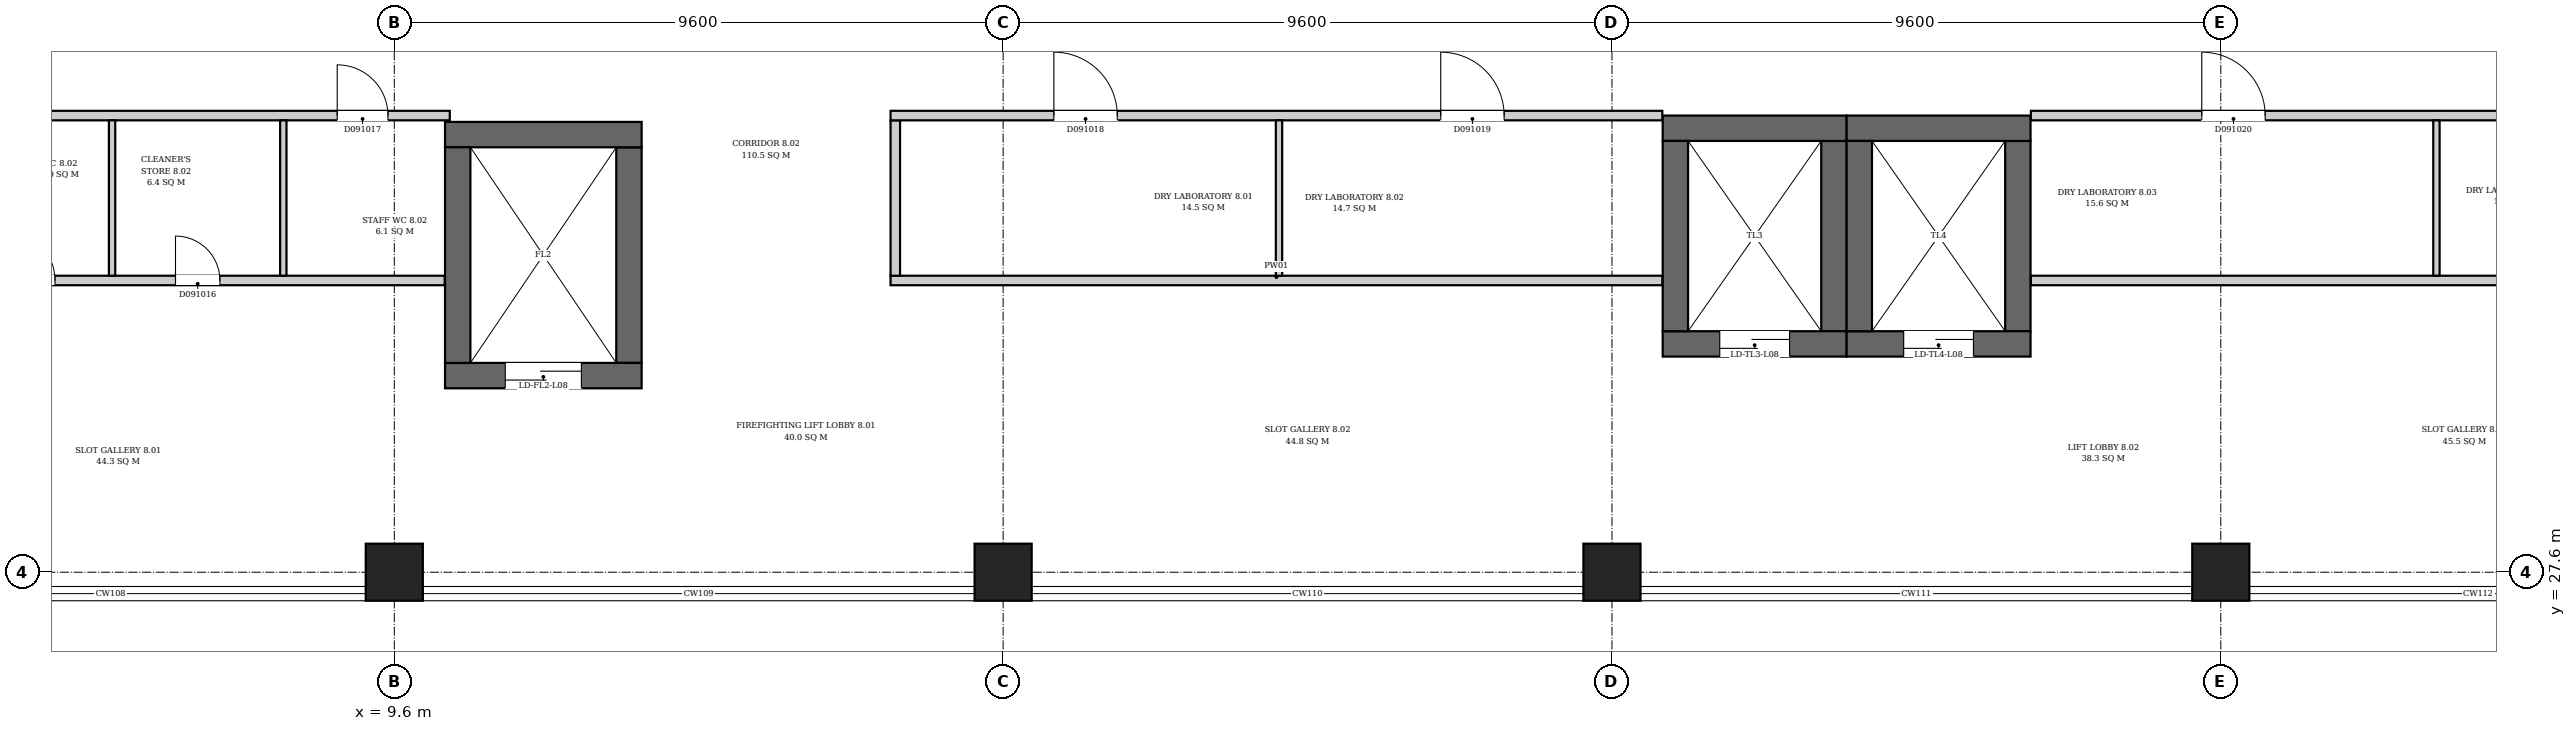
"""IFC4 building model, lengths in metres.
Left out: names, types, materials, properties, quantities, classifications, styles, units other than length and angle.
Written with IfcOpenShell. Run it as: python <this file> out.ifc"""

import sys

from ifc_helpers import new_model, si_unit, direction, frame, frame_2d, origin, origin_2d, place, context, subcontext, project, spatial, rectangle, extrude, element, fill, save


model = new_model("IFC4")
c1 = context("Model", 3, precision=1e-05, world=origin(), true_north=direction((0.0, 1.0)))
c2 = subcontext(c1, "Body", "Model", "MODEL_VIEW")
j1 = project(units=[si_unit("LENGTHUNIT", "METRE"), si_unit("PLANEANGLEUNIT", "RADIAN")], contexts=[c1])
p1 = place(None, origin())
s1 = spatial("IfcSite", under=j1, at=p1, CompositionType="ELEMENT")
p2 = place(p1, origin())
s2 = spatial("IfcBuilding", under=s1, at=p2, CompositionType="ELEMENT")
p3 = place(p2, frame((0.0, 0.0, 44.5)))
s3 = spatial("IfcBuildingStorey", under=s2, at=p3, CompositionType="ELEMENT", Elevation=44.5)
p4 = place(p3, frame((10.4, 30.7, 0.0), z_axis=(0.0, 0.0, 1.0), x_axis=(1.0, 0.0, 0.0)))
e1 = element("IfcWall", 1, at=p4, inside=s3, PredefinedType="SHEAR", context=c2, shape_type="SweptSolid", body=[
    extrude(rectangle(XDim=3.1, YDim=0.4, at=frame_2d((1.55, 0.0))), origin(), (0.0, 0.0, 1.0), 4.2),
])
p5 = place(p4, frame((0.95, 0.0, 0.0)))
e2 = element("IfcOpeningElement", 2, at=p5, cuts=e1, PredefinedType="OPENING", context=c2, shape_type="SweptSolid", body=[
    extrude(rectangle(XDim=1.2, YDim=2.1, at=frame_2d((0.6, 1.05))), frame((0.0, 0.21, 0.0), z_axis=(0.0, -1.0, 0.0), x_axis=(1.0, 0.0, 0.0)), (0.0, 0.0, 1.0), 0.42),
])
p6 = place(p3, frame((10.4, 34.5, 0.0), z_axis=(0.0, 0.0, 1.0), x_axis=(1.0, 0.0, 0.0)))
e3 = element("IfcWall", 3, at=p6, inside=s3, PredefinedType="SHEAR", context=c2, shape_type="SweptSolid", body=[
    extrude(rectangle(XDim=3.1, YDim=0.4, at=frame_2d((1.55, 0.0))), origin(), (0.0, 0.0, 1.0), 4.2),
])
for number, where, z_axis, x_axis in (
    (4, (10.6, 30.9, 0.0), (0.0, 0.0, 1.0), (0.0, 1.0, 0.0)),
    (5, (13.3, 30.9, 0.0), (0.0, 0.0, 1.0), (0.0, 1.0, 0.0)),
):
    element("IfcWall", number, at=place(p3, frame(where, z_axis=z_axis, x_axis=x_axis)), inside=s3, PredefinedType="SHEAR", context=c2, shape_type="SweptSolid", body=[
        extrude(rectangle(XDim=3.4, YDim=0.4, at=frame_2d((1.7, 0.0))), origin(), (0.0, 0.0, 1.0), 4.2),
    ])
p7 = place(p3, frame((29.6, 31.2, 0.0), z_axis=(0.0, 0.0, 1.0), x_axis=(1.0, 0.0, 0.0)))
e6 = element("IfcWall", 6, at=p7, inside=s3, PredefinedType="SHEAR", context=c2, shape_type="SweptSolid", body=[
    extrude(rectangle(XDim=2.9, YDim=0.4, at=frame_2d((1.45, 0.0))), origin(), (0.0, 0.0, 1.0), 4.2),
])
p8 = place(p7, frame((0.9, 0.0, 0.0)))
e7 = element("IfcOpeningElement", 7, at=p8, cuts=e6, PredefinedType="OPENING", context=c2, shape_type="SweptSolid", body=[
    extrude(rectangle(XDim=1.1, YDim=2.1, at=frame_2d((0.55, 1.05))), frame((0.0, 0.21, 0.0), z_axis=(0.0, -1.0, 0.0), x_axis=(1.0, 0.0, 0.0)), (0.0, 0.0, 1.0), 0.42),
])
p9 = place(p3, frame((29.6, 34.6, 0.0), z_axis=(0.0, 0.0, 1.0), x_axis=(1.0, 0.0, 0.0)))
e8 = element("IfcWall", 8, at=p9, inside=s3, PredefinedType="SHEAR", context=c2, shape_type="SweptSolid", body=[
    extrude(rectangle(XDim=2.9, YDim=0.4, at=frame_2d((1.45, 0.0))), origin(), (0.0, 0.0, 1.0), 4.2),
])
for number, where, z_axis, x_axis in (
    (9, (29.8, 31.4, 0.0), (0.0, 0.0, 1.0), (0.0, 1.0, 0.0)),
    (10, (32.3, 31.4, 0.0), (0.0, 0.0, 1.0), (0.0, 1.0, 0.0)),
):
    element("IfcWall", number, at=place(p3, frame(where, z_axis=z_axis, x_axis=x_axis)), inside=s3, PredefinedType="SHEAR", context=c2, shape_type="SweptSolid", body=[
        extrude(rectangle(XDim=3.0, YDim=0.4, at=frame_2d((1.5, 0.0))), origin(), (0.0, 0.0, 1.0), 4.2),
    ])
p10 = place(p3, frame((32.5, 31.2, 0.0), z_axis=(0.0, 0.0, 1.0), x_axis=(1.0, 0.0, 0.0)))
e11 = element("IfcWall", 11, at=p10, inside=s3, PredefinedType="SHEAR", context=c2, shape_type="SweptSolid", body=[
    extrude(rectangle(XDim=2.9, YDim=0.4, at=frame_2d((1.45, 0.0))), origin(), (0.0, 0.0, 1.0), 4.2),
])
p11 = place(p10, frame((0.9, 0.0, 0.0)))
e12 = element("IfcOpeningElement", 12, at=p11, cuts=e11, PredefinedType="OPENING", context=c2, shape_type="SweptSolid", body=[
    extrude(rectangle(XDim=1.1, YDim=2.1, at=frame_2d((0.55, 1.05))), frame((0.0, 0.21, 0.0), z_axis=(0.0, -1.0, 0.0), x_axis=(1.0, 0.0, 0.0)), (0.0, 0.0, 1.0), 0.42),
])
p12 = place(p3, frame((32.5, 34.6, 0.0), z_axis=(0.0, 0.0, 1.0), x_axis=(1.0, 0.0, 0.0)))
e13 = element("IfcWall", 13, at=p12, inside=s3, PredefinedType="SHEAR", context=c2, shape_type="SweptSolid", body=[
    extrude(rectangle(XDim=2.9, YDim=0.4, at=frame_2d((1.45, 0.0))), origin(), (0.0, 0.0, 1.0), 4.2),
])
for number, where, z_axis, x_axis in (
    (14, (32.7, 31.4, 0.0), (0.0, 0.0, 1.0), (0.0, 1.0, 0.0)),
    (15, (35.2, 31.4, 0.0), (0.0, 0.0, 1.0), (0.0, 1.0, 0.0)),
):
    element("IfcWall", number, at=place(p3, frame(where, z_axis=z_axis, x_axis=x_axis)), inside=s3, PredefinedType="SHEAR", context=c2, shape_type="SweptSolid", body=[
        extrude(rectangle(XDim=3.0, YDim=0.4, at=frame_2d((1.5, 0.0))), origin(), (0.0, 0.0, 1.0), 4.2),
    ])
for number, where, z_axis, x_axis in (
    (16, (9.6, 27.6, 0.0), (0.0, 0.0, 1.0), (1.0, 0.0, 0.0)),
    (17, (19.2, 27.6, 0.0), (0.0, 0.0, 1.0), (1.0, 0.0, 0.0)),
    (18, (28.8, 27.6, 0.0), (0.0, 0.0, 1.0), (1.0, 0.0, 0.0)),
    (19, (38.4, 27.6, 0.0), (0.0, 0.0, 1.0), (1.0, 0.0, 0.0)),
):
    element("IfcColumn", number, at=place(p3, frame(where, z_axis=z_axis, x_axis=x_axis)), inside=s3, PredefinedType="COLUMN", context=c2, shape_type="SweptSolid", body=[
        extrude(rectangle(XDim=0.9, YDim=0.9, at=origin_2d()), origin(), (0.0, 0.0, 1.0), 4.2),
    ])
p13 = place(p3, frame((0.056, 32.2, 0.0), z_axis=(0.0, 0.0, 1.0), x_axis=(1.0, 0.0, 0.0)))
e20 = element("IfcWall", 20, at=p13, inside=s3, PredefinedType="PARTITIONING", context=c2, shape_type="SweptSolid", body=[
    extrude(rectangle(XDim=10.338, YDim=0.15, at=frame_2d((5.169, 0.0))), origin(), (0.0, 0.0, 1.0), 3.9),
])
p14 = place(p13, frame((0.794, 0.0, 0.0)))
e21 = element("IfcOpeningElement", 21, at=p14, cuts=e20, PredefinedType="OPENING", context=c2, shape_type="SweptSolid", body=[
    extrude(rectangle(XDim=0.9, YDim=2.1, at=frame_2d((0.45, 1.05))), frame((0.0, 0.085, 0.0), z_axis=(0.0, -1.0, 0.0), x_axis=(1.0, 0.0, 0.0)), (0.0, 0.0, 1.0), 0.17),
])
p15 = place(p13, frame((3.394, 0.0, 0.0)))
e22 = element("IfcOpeningElement", 22, at=p15, cuts=e20, PredefinedType="OPENING", context=c2, shape_type="SweptSolid", body=[
    extrude(rectangle(XDim=0.8, YDim=2.1, at=frame_2d((0.4, 1.05))), frame((0.0, 0.085, 0.0), z_axis=(0.0, -1.0, 0.0), x_axis=(1.0, 0.0, 0.0)), (0.0, 0.0, 1.0), 0.17),
])
p16 = place(p13, frame((6.094, 0.0, 0.0)))
e23 = element("IfcOpeningElement", 23, at=p16, cuts=e20, PredefinedType="OPENING", context=c2, shape_type="SweptSolid", body=[
    extrude(rectangle(XDim=0.7, YDim=2.1, at=frame_2d((0.35, 1.05))), frame((0.0, 0.085, 0.0), z_axis=(0.0, -1.0, 0.0), x_axis=(1.0, 0.0, 0.0)), (0.0, 0.0, 1.0), 0.17),
])
p17 = place(p3, frame((0.056, 34.8, 0.0), z_axis=(0.0, 0.0, 1.0), x_axis=(1.0, 0.0, 0.0)))
e24 = element("IfcWall", 24, at=p17, inside=s3, PredefinedType="PARTITIONING", context=c2, shape_type="SweptSolid", body=[
    extrude(rectangle(XDim=10.419, YDim=0.15, at=frame_2d((5.209, 0.0))), origin(), (0.0, 0.0, 1.0), 3.9),
])
p18 = place(p17, frame((8.644, 0.0, 0.0)))
e25 = element("IfcOpeningElement", 25, at=p18, cuts=e24, PredefinedType="OPENING", context=c2, shape_type="SweptSolid", body=[
    extrude(rectangle(XDim=0.8, YDim=2.1, at=frame_2d((0.4, 1.05))), frame((0.0, 0.085, 0.0), z_axis=(0.0, -1.0, 0.0), x_axis=(1.0, 0.0, 0.0)), (0.0, 0.0, 1.0), 0.17),
])
for number, where, z_axis, x_axis in (
    (26, (5.15, 32.275, 0.0), (0.0, 0.0, 1.0), (0.0, 1.0, 0.0)),
    (27, (7.85, 32.275, 0.0), (0.0, 0.0, 1.0), (0.0, 1.0, 0.0)),
):
    element("IfcWall", number, at=place(p3, frame(where, z_axis=z_axis, x_axis=x_axis)), inside=s3, PredefinedType="PARTITIONING", context=c2, shape_type="SweptSolid", body=[
        extrude(rectangle(XDim=2.45, YDim=0.1, at=frame_2d((1.225, 0.0))), origin(), (0.0, 0.0, 1.0), 3.9),
    ])
p19 = place(p3, frame((17.425, 32.2, 0.0), z_axis=(0.0, 0.0, 1.0), x_axis=(1.0, 0.0, 0.0)))
e28 = element("IfcWall", 28, at=p19, inside=s3, PredefinedType="PARTITIONING", context=c2, shape_type="SweptSolid", body=[
    extrude(rectangle(XDim=12.169, YDim=0.15, at=frame_2d((6.084, 0.0))), origin(), (0.0, 0.0, 1.0), 3.9),
])
p20 = place(p3, frame((17.5, 32.275, 0.0), z_axis=(0.0, 0.0, 1.0), x_axis=(0.0, 1.0, 0.0)))
e29 = element("IfcWall", 29, at=p20, inside=s3, PredefinedType="PARTITIONING", context=c2, shape_type="SweptSolid", body=[
    extrude(rectangle(XDim=2.45, YDim=0.15, at=frame_2d((1.225, 0.0))), origin(), (0.0, 0.0, 1.0), 3.9),
])
p21 = place(p3, frame((17.425, 34.8, 0.0), z_axis=(0.0, 0.0, 1.0), x_axis=(1.0, 0.0, 0.0)))
e30 = element("IfcWall", 30, at=p21, inside=s3, PredefinedType="PARTITIONING", context=c2, shape_type="SweptSolid", body=[
    extrude(rectangle(XDim=12.169, YDim=0.15, at=frame_2d((6.084, 0.0))), origin(), (0.0, 0.0, 1.0), 3.9),
])
p22 = place(p21, frame((2.575, 0.0, 0.0)))
e31 = element("IfcOpeningElement", 31, at=p22, cuts=e30, PredefinedType="OPENING", context=c2, shape_type="SweptSolid", body=[
    extrude(rectangle(XDim=1.0, YDim=2.1, at=frame_2d((0.5, 1.05))), frame((0.0, 0.085, 0.0), z_axis=(0.0, -1.0, 0.0), x_axis=(1.0, 0.0, 0.0)), (0.0, 0.0, 1.0), 0.17),
])
p23 = place(p21, frame((8.675, 0.0, 0.0)))
e32 = element("IfcOpeningElement", 32, at=p23, cuts=e30, PredefinedType="OPENING", context=c2, shape_type="SweptSolid", body=[
    extrude(rectangle(XDim=1.0, YDim=2.1, at=frame_2d((0.5, 1.05))), frame((0.0, 0.085, 0.0), z_axis=(0.0, -1.0, 0.0), x_axis=(1.0, 0.0, 0.0)), (0.0, 0.0, 1.0), 0.17),
])
p24 = place(p3, frame((23.55, 32.275, 0.0), z_axis=(0.0, 0.0, 1.0), x_axis=(0.0, 1.0, 0.0)))
e33 = element("IfcWall", 33, at=p24, inside=s3, PredefinedType="PARTITIONING", context=c2, shape_type="SweptSolid", body=[
    extrude(rectangle(XDim=2.45, YDim=0.1, at=frame_2d((1.225, 0.0))), origin(), (0.0, 0.0, 1.0), 3.9),
])
p25 = place(p3, frame((35.406, 32.2, 0.0), z_axis=(0.0, 0.0, 1.0), x_axis=(1.0, 0.0, 0.0)))
e34 = element("IfcWall", 34, at=p25, inside=s3, PredefinedType="PARTITIONING", context=c2, shape_type="SweptSolid", body=[
    extrude(rectangle(XDim=12.788, YDim=0.15, at=frame_2d((6.394, 0.0))), origin(), (0.0, 0.0, 1.0), 3.9),
])
p26 = place(p25, frame((9.094, 0.0, 0.0)))
e35 = element("IfcOpeningElement", 35, at=p26, cuts=e34, PredefinedType="OPENING", context=c2, shape_type="SweptSolid", body=[
    extrude(rectangle(XDim=1.0, YDim=2.1, at=frame_2d((0.5, 1.05))), frame((0.0, 0.085, 0.0), z_axis=(0.0, -1.0, 0.0), x_axis=(1.0, 0.0, 0.0)), (0.0, 0.0, 1.0), 0.17),
])
p27 = place(p3, frame((35.406, 34.8, 0.0), z_axis=(0.0, 0.0, 1.0), x_axis=(1.0, 0.0, 0.0)))
e36 = element("IfcWall", 36, at=p27, inside=s3, PredefinedType="PARTITIONING", context=c2, shape_type="SweptSolid", body=[
    extrude(rectangle(XDim=12.788, YDim=0.15, at=frame_2d((6.394, 0.0))), origin(), (0.0, 0.0, 1.0), 3.9),
])
p28 = place(p27, frame((2.694, 0.0, 0.0)))
e37 = element("IfcOpeningElement", 37, at=p28, cuts=e36, PredefinedType="OPENING", context=c2, shape_type="SweptSolid", body=[
    extrude(rectangle(XDim=1.0, YDim=2.1, at=frame_2d((0.5, 1.05))), frame((0.0, 0.085, 0.0), z_axis=(0.0, -1.0, 0.0), x_axis=(1.0, 0.0, 0.0)), (0.0, 0.0, 1.0), 0.17),
])
p29 = place(p3, frame((41.8, 32.275, 0.0), z_axis=(0.0, 0.0, 1.0), x_axis=(0.0, 1.0, 0.0)))
e38 = element("IfcWall", 38, at=p29, inside=s3, PredefinedType="PARTITIONING", context=c2, shape_type="SweptSolid", body=[
    extrude(rectangle(XDim=2.45, YDim=0.1, at=frame_2d((1.225, 0.0))), origin(), (0.0, 0.0, 1.0), 3.9),
])
p30 = place(p5, origin())
e39 = element("IfcDoor", 39, at=p30, inside=s3, OperationType="DOUBLE_DOOR_SLIDING", PredefinedType="DOOR", context=c2, shape_type="SweptSolid", body=[
    extrude(rectangle(XDim=1.2, YDim=2.1, at=frame_2d((0.6, 1.05))), frame((0.0, 0.025, 0.0), z_axis=(0.0, -1.0, 0.0), x_axis=(1.0, 0.0, 0.0)), (0.0, 0.0, 1.0), 0.05),
])
fill(e2, e39)
p31 = place(p8, origin())
e40 = element("IfcDoor", 40, at=p31, inside=s3, OperationType="DOUBLE_DOOR_SLIDING", PredefinedType="DOOR", context=c2, shape_type="SweptSolid", body=[
    extrude(rectangle(XDim=1.1, YDim=2.1, at=frame_2d((0.55, 1.05))), frame((0.0, 0.025, 0.0), z_axis=(0.0, -1.0, 0.0), x_axis=(1.0, 0.0, 0.0)), (0.0, 0.0, 1.0), 0.05),
])
fill(e7, e40)
p32 = place(p11, origin())
e41 = element("IfcDoor", 41, at=p32, inside=s3, OperationType="DOUBLE_DOOR_SLIDING", PredefinedType="DOOR", context=c2, shape_type="SweptSolid", body=[
    extrude(rectangle(XDim=1.1, YDim=2.1, at=frame_2d((0.55, 1.05))), frame((0.0, 0.025, 0.0), z_axis=(0.0, -1.0, 0.0), x_axis=(1.0, 0.0, 0.0)), (0.0, 0.0, 1.0), 0.05),
])
fill(e12, e41)
p33 = place(p15, origin())
e42 = element("IfcDoor", 42, at=p33, inside=s3, OperationType="SINGLE_SWING_RIGHT", PredefinedType="DOOR", context=c2, shape_type="SweptSolid", body=[
    extrude(rectangle(XDim=0.8, YDim=2.1, at=frame_2d((0.4, 1.05))), frame((0.0, 0.025, 0.0), z_axis=(0.0, -1.0, 0.0), x_axis=(1.0, 0.0, 0.0)), (0.0, 0.0, 1.0), 0.05),
])
fill(e22, e42)
p34 = place(p16, origin())
e43 = element("IfcDoor", 43, at=p34, inside=s3, OperationType="SINGLE_SWING_RIGHT", PredefinedType="DOOR", context=c2, shape_type="SweptSolid", body=[
    extrude(rectangle(XDim=0.7, YDim=2.1, at=frame_2d((0.35, 1.05))), frame((0.0, 0.025, 0.0), z_axis=(0.0, -1.0, 0.0), x_axis=(1.0, 0.0, 0.0)), (0.0, 0.0, 1.0), 0.05),
])
fill(e23, e43)
p35 = place(p18, origin())
e44 = element("IfcDoor", 44, at=p35, inside=s3, OperationType="SINGLE_SWING_LEFT", PredefinedType="DOOR", context=c2, shape_type="SweptSolid", body=[
    extrude(rectangle(XDim=0.8, YDim=2.1, at=frame_2d((0.4, 1.05))), frame((0.0, 0.025, 0.0), z_axis=(0.0, -1.0, 0.0), x_axis=(1.0, 0.0, 0.0)), (0.0, 0.0, 1.0), 0.05),
])
fill(e25, e44)
p36 = place(p22, origin())
e45 = element("IfcDoor", 45, at=p36, inside=s3, OperationType="SINGLE_SWING_LEFT", PredefinedType="DOOR", context=c2, shape_type="SweptSolid", body=[
    extrude(rectangle(XDim=1.0, YDim=2.1, at=frame_2d((0.5, 1.05))), frame((0.0, 0.025, 0.0), z_axis=(0.0, -1.0, 0.0), x_axis=(1.0, 0.0, 0.0)), (0.0, 0.0, 1.0), 0.05),
])
fill(e31, e45)
p37 = place(p23, origin())
e46 = element("IfcDoor", 46, at=p37, inside=s3, OperationType="SINGLE_SWING_LEFT", PredefinedType="DOOR", context=c2, shape_type="SweptSolid", body=[
    extrude(rectangle(XDim=1.0, YDim=2.1, at=frame_2d((0.5, 1.05))), frame((0.0, 0.025, 0.0), z_axis=(0.0, -1.0, 0.0), x_axis=(1.0, 0.0, 0.0)), (0.0, 0.0, 1.0), 0.05),
])
fill(e32, e46)
p38 = place(p28, origin())
e47 = element("IfcDoor", 47, at=p38, inside=s3, OperationType="SINGLE_SWING_RIGHT", PredefinedType="DOOR", context=c2, shape_type="SweptSolid", body=[
    extrude(rectangle(XDim=1.0, YDim=2.1, at=frame_2d((0.5, 1.05))), frame((0.0, 0.025, 0.0), z_axis=(0.0, -1.0, 0.0), x_axis=(1.0, 0.0, 0.0)), (0.0, 0.0, 1.0), 0.05),
])
fill(e37, e47)
save(model, sys.argv[1])
